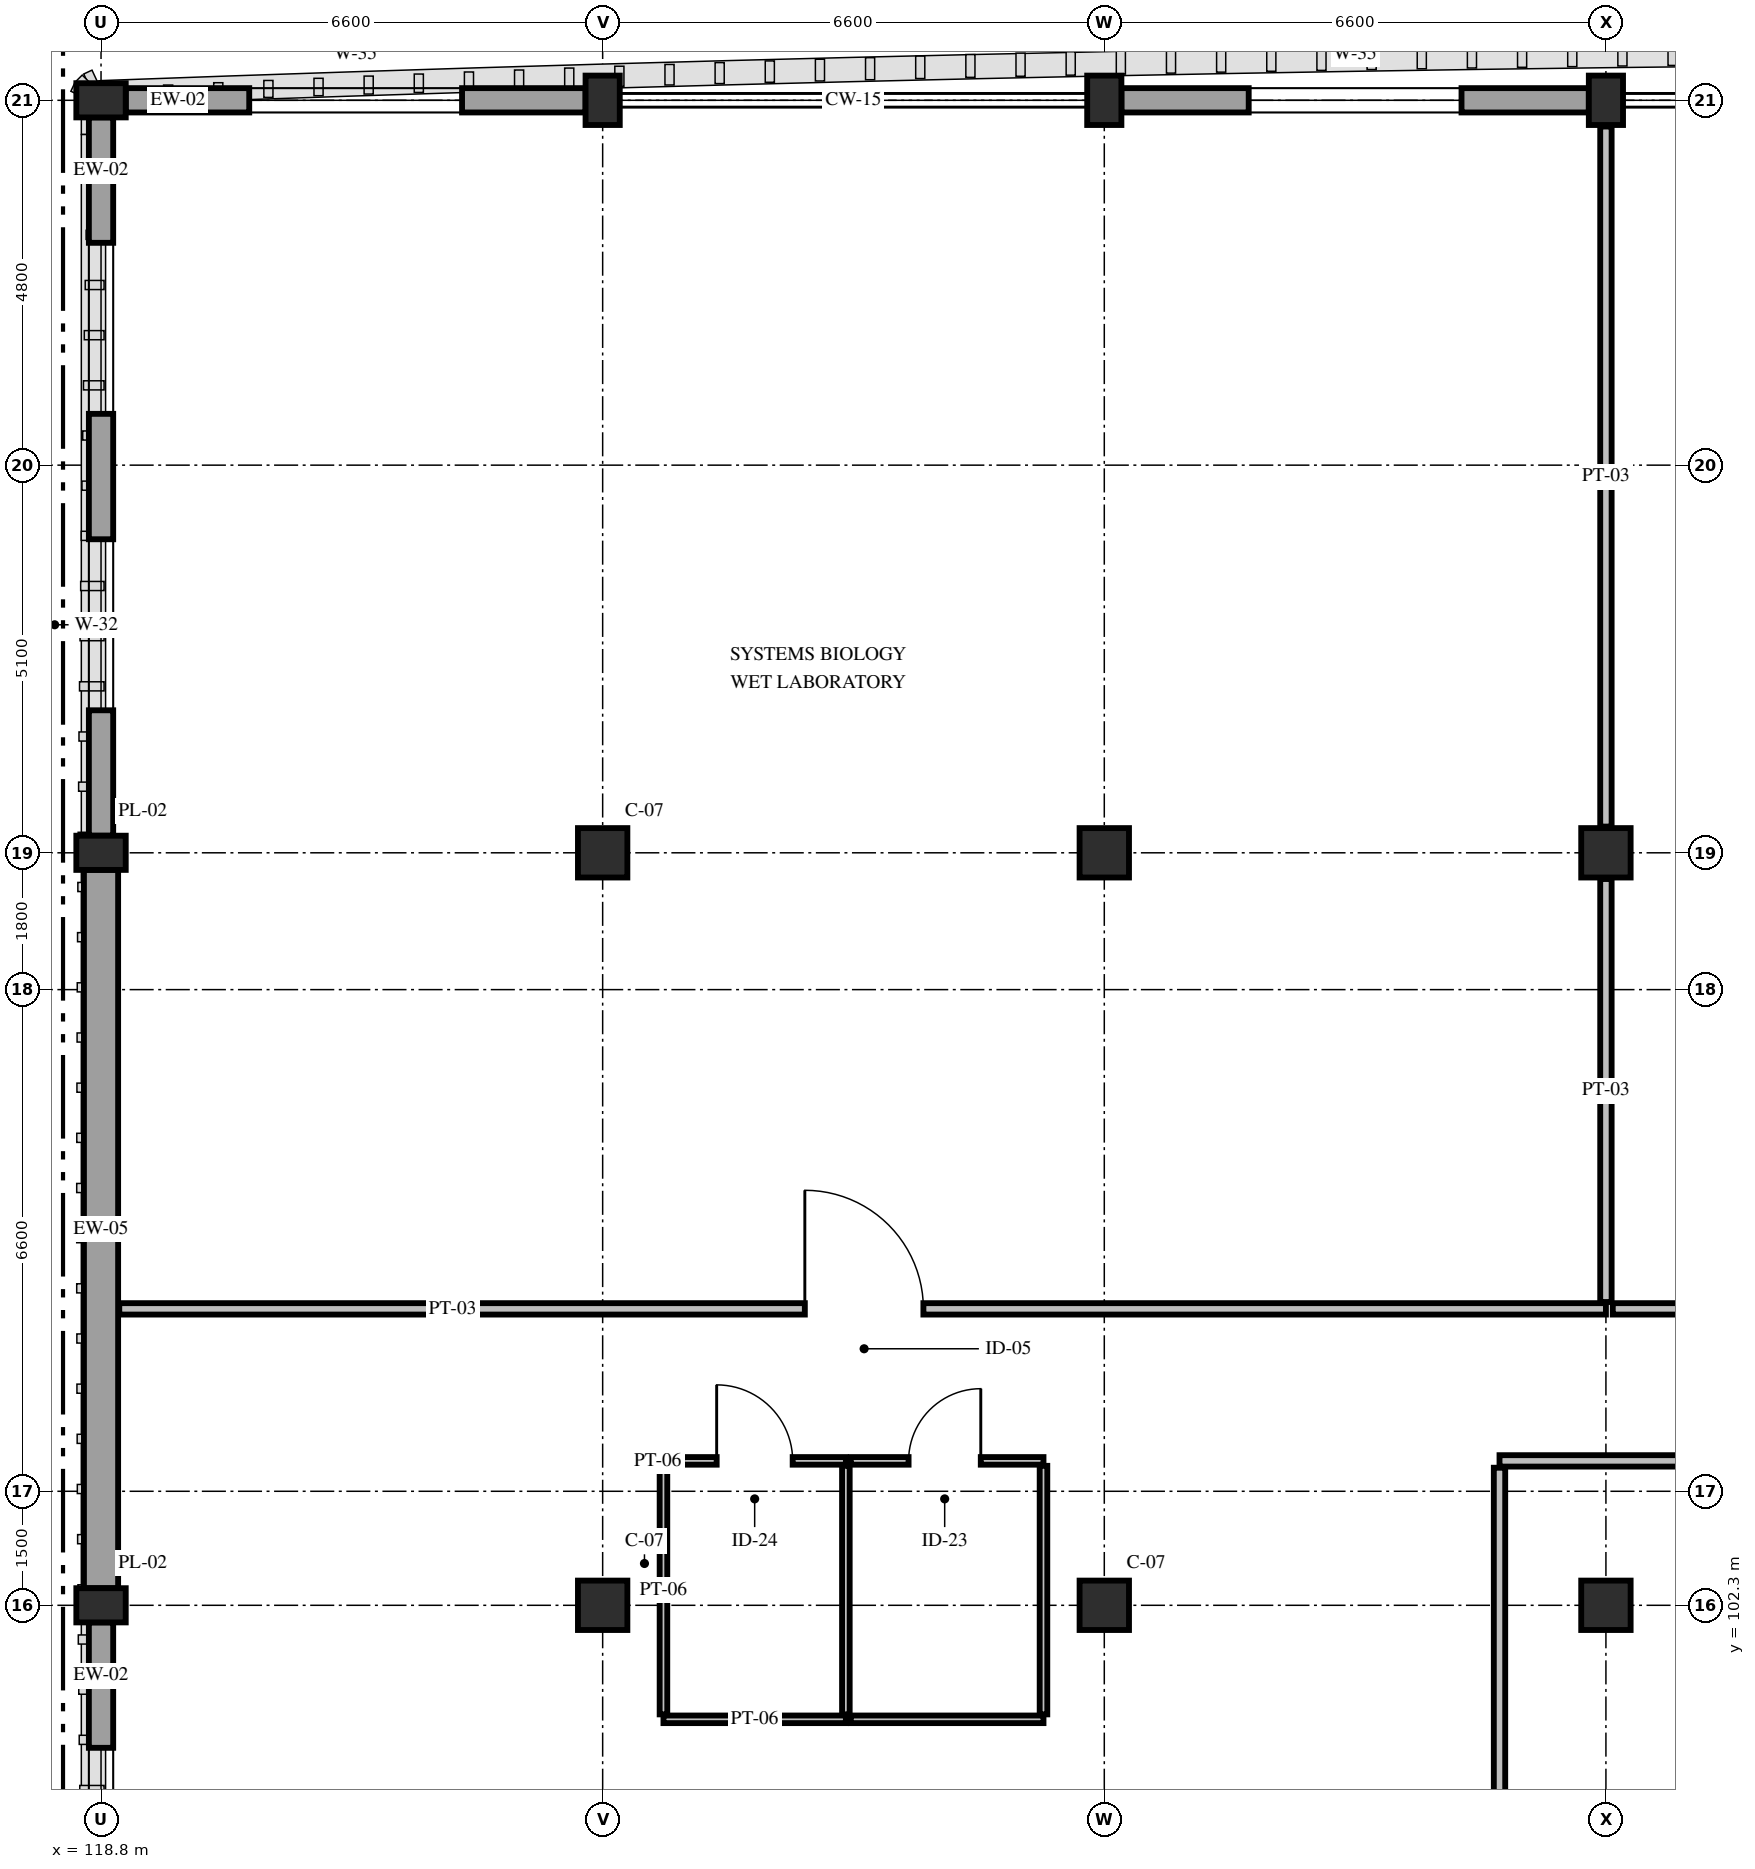
"""IFC4 building model, lengths in metres.
Left out: names, types, materials, properties, quantities, classifications, styles, units other than length and angle.
Written with IfcOpenShell. Run it as: python <this file> out.ifc"""

import sys

from ifc_helpers import new_model, si_unit, direction, frame, frame_2d, origin, origin_2d, place, context, subcontext, project, spatial, rectangle, extrude, element, fill, save


model = new_model("IFC4")
c1 = context("Model", 3, precision=1e-05, world=origin(), true_north=direction((0.0, 1.0)))
c2 = subcontext(c1, "Body", "Model", "MODEL_VIEW")
j1 = project(units=[si_unit("LENGTHUNIT", "METRE"), si_unit("PLANEANGLEUNIT", "RADIAN")], contexts=[c1])
p1 = place(None, origin())
s1 = spatial("IfcSite", under=j1, at=p1, CompositionType="ELEMENT")
p2 = place(p1, origin())
s2 = spatial("IfcBuilding", under=s1, at=p2, CompositionType="ELEMENT")
p3 = place(p2, frame((0.0, 0.0, 15.0)))
s3 = spatial("IfcBuildingStorey", under=s2, at=p3, CompositionType="ELEMENT", Elevation=15.0)
for number, where, z_axis, x_axis in (
    (1, (118.8, 102.3, 0.0), (0.0, 0.0, 1.0), (0.0, 1.0, 0.0)),
    (2, (118.8, 112.2, 0.0), (0.0, 0.0, 1.0), (0.0, 1.0, 0.0)),
    (3, (118.8, 122.1, 0.0), (0.0, 0.0, 1.0), (0.0, 1.0, 0.0)),
):
    element("IfcColumn", number, at=place(p3, frame(where, z_axis=z_axis, x_axis=x_axis)), inside=s3, PredefinedType="PILASTER", context=c2, shape_type="SweptSolid", body=[
        extrude(rectangle(XDim=0.45, YDim=0.65, at=origin_2d()), origin(), (0.0, 0.0, 1.0), 4.8),
    ])
for number, where, z_axis, x_axis in (
    (4, (125.4, 102.3, 0.0), (0.0, 0.0, 1.0), (1.0, 0.0, 0.0)),
    (5, (125.4, 112.2, 0.0), (0.0, 0.0, 1.0), (1.0, 0.0, 0.0)),
):
    element("IfcColumn", number, at=place(p3, frame(where, z_axis=z_axis, x_axis=x_axis)), inside=s3, PredefinedType="COLUMN", context=c2, shape_type="SweptSolid", body=[
        extrude(rectangle(XDim=0.65, YDim=0.65, at=origin_2d()), origin(), (0.0, 0.0, 1.0), 4.8),
    ])
p4 = place(p3, frame((125.4, 122.1, 0.0), z_axis=(0.0, 0.0, 1.0), x_axis=(1.0, 0.0, 0.0)))
e6 = element("IfcColumn", 6, at=p4, inside=s3, PredefinedType="PILASTER", context=c2, shape_type="SweptSolid", body=[
    extrude(rectangle(XDim=0.45, YDim=0.65, at=origin_2d()), origin(), (0.0, 0.0, 1.0), 4.8),
])
for number, where, z_axis, x_axis in (
    (7, (132.0, 102.3, 0.0), (0.0, 0.0, 1.0), (1.0, 0.0, 0.0)),
    (8, (132.0, 112.2, 0.0), (0.0, 0.0, 1.0), (1.0, 0.0, 0.0)),
):
    element("IfcColumn", number, at=place(p3, frame(where, z_axis=z_axis, x_axis=x_axis)), inside=s3, PredefinedType="COLUMN", context=c2, shape_type="SweptSolid", body=[
        extrude(rectangle(XDim=0.65, YDim=0.65, at=origin_2d()), origin(), (0.0, 0.0, 1.0), 4.8),
    ])
p5 = place(p3, frame((132.0, 122.1, 0.0), z_axis=(0.0, 0.0, 1.0), x_axis=(1.0, 0.0, 0.0)))
e9 = element("IfcColumn", 9, at=p5, inside=s3, PredefinedType="PILASTER", context=c2, shape_type="SweptSolid", body=[
    extrude(rectangle(XDim=0.45, YDim=0.65, at=origin_2d()), origin(), (0.0, 0.0, 1.0), 4.8),
])
for number, where, z_axis, x_axis in (
    (10, (138.6, 102.3, 0.0), (0.0, 0.0, 1.0), (1.0, 0.0, 0.0)),
    (11, (138.6, 112.2, 0.0), (0.0, 0.0, 1.0), (1.0, 0.0, 0.0)),
):
    element("IfcColumn", number, at=place(p3, frame(where, z_axis=z_axis, x_axis=x_axis)), inside=s3, PredefinedType="COLUMN", context=c2, shape_type="SweptSolid", body=[
        extrude(rectangle(XDim=0.65, YDim=0.65, at=origin_2d()), origin(), (0.0, 0.0, 1.0), 4.8),
    ])
p6 = place(p3, frame((138.6, 122.1, 0.0), z_axis=(0.0, 0.0, 1.0), x_axis=(1.0, 0.0, 0.0)))
e12 = element("IfcColumn", 12, at=p6, inside=s3, PredefinedType="PILASTER", context=c2, shape_type="SweptSolid", body=[
    extrude(rectangle(XDim=0.45, YDim=0.65, at=origin_2d()), origin(), (0.0, 0.0, 1.0), 4.8),
])
p7 = place(p3, frame((118.8, 92.625, 0.0), z_axis=(0.0, 0.0, 1.0), x_axis=(0.0, 1.0, 0.0)))
e13 = element("IfcWall", 13, at=p7, inside=s3, PredefinedType="STANDARD", context=c2, shape_type="SweptSolid", body=[
    extrude(rectangle(XDim=9.45, YDim=0.32, at=frame_2d((4.725, 0.0))), origin(), (0.0, 0.0, 1.0), 3.95),
])
p8 = place(p7, frame((1.65, 0.0, 0.85)))
e14 = element("IfcOpeningElement", 14, at=p8, cuts=e13, PredefinedType="OPENING", context=c2, shape_type="SweptSolid", body=[
    extrude(rectangle(XDim=2.25, YDim=1.88, at=frame_2d((1.125, 0.94))), frame((0.0, 0.175, 0.0), z_axis=(0.0, -1.0, 0.0), x_axis=(1.0, 0.0, 0.0)), (0.0, 0.0, 1.0), 0.35),
])
p9 = place(p7, frame((5.55, 0.0, 0.85)))
e15 = element("IfcOpeningElement", 15, at=p9, cuts=e13, PredefinedType="OPENING", context=c2, shape_type="SweptSolid", body=[
    extrude(rectangle(XDim=2.25, YDim=1.88, at=frame_2d((1.125, 0.94))), frame((0.0, 0.175, 0.0), z_axis=(0.0, -1.0, 0.0), x_axis=(1.0, 0.0, 0.0)), (0.0, 0.0, 1.0), 0.35),
])
p10 = place(p3, frame((118.8, 102.525, 0.0), z_axis=(0.0, 0.0, 1.0), x_axis=(0.0, 1.0, 0.0)))
e16 = element("IfcWall", 16, at=p10, inside=s3, PredefinedType="SOLIDWALL", context=c2, shape_type="SweptSolid", body=[
    extrude(rectangle(XDim=9.45, YDim=0.45, at=frame_2d((4.725, 0.0))), origin(), (0.0, 0.0, 1.0), 3.95),
])
p11 = place(p3, frame((118.8, 112.425, 0.0), z_axis=(0.0, 0.0, 1.0), x_axis=(0.0, 1.0, 0.0)))
e17 = element("IfcWall", 17, at=p11, inside=s3, PredefinedType="STANDARD", context=c2, shape_type="SweptSolid", body=[
    extrude(rectangle(XDim=9.45, YDim=0.32, at=frame_2d((4.725, 0.0))), origin(), (0.0, 0.0, 1.0), 3.95),
])
p12 = place(p11, frame((1.65, 0.0, 0.85)))
e18 = element("IfcOpeningElement", 18, at=p12, cuts=e17, PredefinedType="OPENING", context=c2, shape_type="SweptSolid", body=[
    extrude(rectangle(XDim=2.25, YDim=1.88, at=frame_2d((1.125, 0.94))), frame((0.0, 0.175, 0.0), z_axis=(0.0, -1.0, 0.0), x_axis=(1.0, 0.0, 0.0)), (0.0, 0.0, 1.0), 0.35),
])
p13 = place(p11, frame((5.55, 0.0, 0.85)))
e19 = element("IfcOpeningElement", 19, at=p13, cuts=e17, PredefinedType="OPENING", context=c2, shape_type="SweptSolid", body=[
    extrude(rectangle(XDim=2.25, YDim=1.88, at=frame_2d((1.125, 0.94))), frame((0.0, 0.175, 0.0), z_axis=(0.0, -1.0, 0.0), x_axis=(1.0, 0.0, 0.0)), (0.0, 0.0, 1.0), 0.35),
])
p14 = place(p3, frame((119.125, 122.1, 0.0), z_axis=(0.0, 0.0, 1.0), x_axis=(1.0, 0.0, 0.0)))
e20 = element("IfcWall", 20, at=p14, inside=s3, PredefinedType="STANDARD", context=c2, shape_type="SweptSolid", body=[
    extrude(rectangle(XDim=6.05, YDim=0.32, at=frame_2d((3.025, 0.0))), origin(), (0.0, 0.0, 1.0), 3.78),
])
p15 = place(p14, frame((1.625, 0.0, 0.85)))
e21 = element("IfcOpeningElement", 21, at=p15, cuts=e20, PredefinedType="OPENING", context=c2, shape_type="SweptSolid", body=[
    extrude(rectangle(XDim=2.8, YDim=1.88, at=frame_2d((1.4, 0.94))), frame((0.0, 0.175, 0.0), z_axis=(0.0, -1.0, 0.0), x_axis=(1.0, 0.0, 0.0)), (0.0, 0.0, 1.0), 0.35),
])
p16 = place(p3, frame((132.225, 122.1, 0.0), z_axis=(0.0, 0.0, 1.0), x_axis=(1.0, 0.0, 0.0)))
e22 = element("IfcWall", 22, at=p16, inside=s3, PredefinedType="STANDARD", context=c2, shape_type="SweptSolid", body=[
    extrude(rectangle(XDim=6.15, YDim=0.32, at=frame_2d((3.075, 0.0))), origin(), (0.0, 0.0, 1.0), 3.78),
])
p17 = place(p16, frame((1.675, 0.0, 0.85)))
e23 = element("IfcOpeningElement", 23, at=p17, cuts=e22, PredefinedType="OPENING", context=c2, shape_type="SweptSolid", body=[
    extrude(rectangle(XDim=2.8, YDim=1.88, at=frame_2d((1.4, 0.94))), frame((0.0, 0.175, 0.0), z_axis=(0.0, -1.0, 0.0), x_axis=(1.0, 0.0, 0.0)), (0.0, 0.0, 1.0), 0.35),
])
p18 = place(p3, frame((126.2, 100.8, 0.0), z_axis=(0.0, 0.0, 1.0), x_axis=(1.0, 0.0, 0.0)))
e24 = element("IfcWall", 24, at=p18, inside=s3, PredefinedType="PARTITIONING", context=c2, shape_type="SweptSolid", body=[
    extrude(rectangle(XDim=2.4, YDim=0.1, at=frame_2d((1.2, 0.0))), origin(), (0.0, 0.0, 1.0), 4.46),
])
p19 = place(p3, frame((126.2, 104.2, 0.0), z_axis=(0.0, 0.0, 1.0), x_axis=(1.0, 0.0, 0.0)))
e25 = element("IfcWall", 25, at=p19, inside=s3, PredefinedType="PARTITIONING", context=c2, shape_type="SweptSolid", body=[
    extrude(rectangle(XDim=2.4, YDim=0.1, at=frame_2d((1.2, 0.0))), origin(), (0.0, 0.0, 1.0), 4.245),
])
p20 = place(p19, frame((0.7, 0.0, 0.0)))
e26 = element("IfcOpeningElement", 26, at=p20, cuts=e25, PredefinedType="OPENING", context=c2, shape_type="SweptSolid", body=[
    extrude(rectangle(XDim=1.0, YDim=2.15, at=frame_2d((0.5, 1.075))), frame((0.0, 0.065, 0.0), z_axis=(0.0, -1.0, 0.0), x_axis=(1.0, 0.0, 0.0)), (0.0, 0.0, 1.0), 0.13),
])
for number, where, z_axis, x_axis in (
    (27, (126.2, 100.865, 0.0), (0.0, 0.0, 1.0), (0.0, 1.0, 0.0)),
    (28, (128.6, 100.865, 0.0), (0.0, 0.0, 1.0), (0.0, 1.0, 0.0)),
):
    element("IfcWall", number, at=place(p3, frame(where, z_axis=z_axis, x_axis=x_axis)), inside=s3, PredefinedType="PARTITIONING", context=c2, shape_type="SweptSolid", body=[
        extrude(rectangle(XDim=3.27, YDim=0.1, at=frame_2d((1.635, 0.0))), origin(), (0.0, 0.0, 1.0), 4.065),
    ])
p21 = place(p3, frame((128.665, 100.8, 0.0), z_axis=(0.0, 0.0, 1.0), x_axis=(1.0, 0.0, 0.0)))
e29 = element("IfcWall", 29, at=p21, inside=s3, PredefinedType="PARTITIONING", context=c2, shape_type="SweptSolid", body=[
    extrude(rectangle(XDim=2.535, YDim=0.1, at=frame_2d((1.268, 0.0))), origin(), (0.0, 0.0, 1.0), 4.46),
])
p22 = place(p3, frame((128.665, 104.2, 0.0), z_axis=(0.0, 0.0, 1.0), x_axis=(1.0, 0.0, 0.0)))
e30 = element("IfcWall", 30, at=p22, inside=s3, PredefinedType="PARTITIONING", context=c2, shape_type="SweptSolid", body=[
    extrude(rectangle(XDim=2.535, YDim=0.1, at=frame_2d((1.268, 0.0))), origin(), (0.0, 0.0, 1.0), 4.245),
])
p23 = place(p22, frame((0.76, 0.0, 0.0)))
e31 = element("IfcOpeningElement", 31, at=p23, cuts=e30, PredefinedType="OPENING", context=c2, shape_type="SweptSolid", body=[
    extrude(rectangle(XDim=0.95, YDim=2.15, at=frame_2d((0.475, 1.075))), frame((0.0, 0.065, 0.0), z_axis=(0.0, -1.0, 0.0), x_axis=(1.0, 0.0, 0.0)), (0.0, 0.0, 1.0), 0.13),
])
p24 = place(p3, frame((131.2, 100.865, 0.0), z_axis=(0.0, 0.0, 1.0), x_axis=(0.0, 1.0, 0.0)))
e32 = element("IfcWall", 32, at=p24, inside=s3, PredefinedType="PARTITIONING", context=c2, shape_type="SweptSolid", body=[
    extrude(rectangle(XDim=3.27, YDim=0.1, at=frame_2d((1.635, 0.0))), origin(), (0.0, 0.0, 1.0), 4.065),
])
p25 = place(p3, frame((119.04, 106.2, 0.0), z_axis=(0.0, 0.0, 1.0), x_axis=(1.0, 0.0, 0.0)))
e33 = element("IfcWall", 33, at=p25, inside=s3, PredefinedType="PARTITIONING", context=c2, shape_type="SweptSolid", body=[
    extrude(rectangle(XDim=19.56, YDim=0.15, at=frame_2d((9.78, 0.0))), origin(), (0.0, 0.0, 1.0), 3.78),
])
p26 = place(p25, frame((9.02, 0.0, 0.0)))
e34 = element("IfcOpeningElement", 34, at=p26, cuts=e33, PredefinedType="OPENING", context=c2, shape_type="SweptSolid", body=[
    extrude(rectangle(XDim=1.56, YDim=2.3, at=frame_2d((0.78, 1.15))), frame((0.0, 0.09, 0.0), z_axis=(0.0, -1.0, 0.0), x_axis=(1.0, 0.0, 0.0)), (0.0, 0.0, 1.0), 0.18),
])
p27 = place(p3, frame((138.6, 106.29, 0.0), z_axis=(0.0, 0.0, 1.0), x_axis=(0.0, 1.0, 0.0)))
e35 = element("IfcWall", 35, at=p27, inside=s3, PredefinedType="PARTITIONING", context=c2, shape_type="SweptSolid", body=[
    extrude(rectangle(XDim=5.565, YDim=0.15, at=frame_2d((2.782, 0.0))), origin(), (0.0, 0.0, 1.0), 3.78),
])
p28 = place(p3, frame((138.6, 112.545, 0.0), z_axis=(0.0, 0.0, 1.0), x_axis=(0.0, 1.0, 0.0)))
e36 = element("IfcWall", 36, at=p28, inside=s3, PredefinedType="PARTITIONING", context=c2, shape_type="SweptSolid", body=[
    extrude(rectangle(XDim=9.21, YDim=0.15, at=frame_2d((4.605, 0.0))), origin(), (0.0, 0.0, 1.0), 3.78),
])
p29 = place(p3, frame((138.69, 106.2, 0.0), z_axis=(0.0, 0.0, 1.0), x_axis=(1.0, 0.0, 0.0)))
e37 = element("IfcWall", 37, at=p29, inside=s3, PredefinedType="PARTITIONING", context=c2, shape_type="SweptSolid", body=[
    extrude(rectangle(XDim=13.11, YDim=0.15, at=frame_2d((6.555, 0.0))), origin(), (0.0, 0.0, 1.0), 3.78),
])
p30 = place(p29, frame((7.31, 0.0, 0.0)))
e38 = element("IfcOpeningElement", 38, at=p30, cuts=e37, PredefinedType="OPENING", context=c2, shape_type="SweptSolid", body=[
    extrude(rectangle(XDim=1.5, YDim=2.25, at=frame_2d((0.75, 1.125))), frame((0.0, 0.09, 0.0), z_axis=(0.0, -1.0, 0.0), x_axis=(1.0, 0.0, 0.0)), (0.0, 0.0, 1.0), 0.18),
])
p31 = place(p3, frame((137.2, 104.2, 0.0), z_axis=(0.0, 0.0, 1.0), x_axis=(1.0, 0.0, 0.0)))
e39 = element("IfcWall", 39, at=p31, inside=s3, PredefinedType="PARTITIONING", context=c2, shape_type="SweptSolid", body=[
    extrude(rectangle(XDim=11.2, YDim=0.15, at=frame_2d((5.6, 0.0))), origin(), (0.0, 0.0, 1.0), 3.78),
])
p32 = place(p31, frame((4.85, 0.0, 0.0)))
e40 = element("IfcOpeningElement", 40, at=p32, cuts=e39, PredefinedType="OPENING", context=c2, shape_type="SweptSolid", body=[
    extrude(rectangle(XDim=1.5, YDim=2.25, at=frame_2d((0.75, 1.125))), frame((0.0, 0.09, 0.0), z_axis=(0.0, -1.0, 0.0), x_axis=(1.0, 0.0, 0.0)), (0.0, 0.0, 1.0), 0.18),
])
p33 = place(p3, frame((137.2, 92.44, 0.0), z_axis=(0.0, 0.0, 1.0), x_axis=(0.0, 1.0, 0.0)))
e41 = element("IfcWall", 41, at=p33, inside=s3, PredefinedType="PARTITIONING", context=c2, shape_type="SweptSolid", body=[
    extrude(rectangle(XDim=11.67, YDim=0.15, at=frame_2d((5.835, 0.0))), origin(), (0.0, 0.0, 1.0), 3.93),
])
p34 = place(p9, origin())
e42 = element("IfcWindow", 42, at=p34, inside=s3, PartitioningType="DOUBLE_PANEL_VERTICAL", PredefinedType="WINDOW", context=c2, shape_type="SweptSolid", body=[
    extrude(rectangle(XDim=2.25, YDim=1.88, at=frame_2d((1.125, 0.94))), frame((0.0, 0.03, 0.0), z_axis=(0.0, -1.0, 0.0), x_axis=(1.0, 0.0, 0.0)), (0.0, 0.0, 1.0), 0.06),
])
fill(e15, e42)
p35 = place(p12, origin())
e43 = element("IfcWindow", 43, at=p35, inside=s3, PartitioningType="DOUBLE_PANEL_VERTICAL", PredefinedType="WINDOW", context=c2, shape_type="SweptSolid", body=[
    extrude(rectangle(XDim=2.25, YDim=1.88, at=frame_2d((1.125, 0.94))), frame((0.0, 0.03, 0.0), z_axis=(0.0, -1.0, 0.0), x_axis=(1.0, 0.0, 0.0)), (0.0, 0.0, 1.0), 0.06),
])
fill(e18, e43)
p36 = place(p13, origin())
e44 = element("IfcWindow", 44, at=p36, inside=s3, PartitioningType="DOUBLE_PANEL_VERTICAL", PredefinedType="WINDOW", context=c2, shape_type="SweptSolid", body=[
    extrude(rectangle(XDim=2.25, YDim=1.88, at=frame_2d((1.125, 0.94))), frame((0.0, 0.03, 0.0), z_axis=(0.0, -1.0, 0.0), x_axis=(1.0, 0.0, 0.0)), (0.0, 0.0, 1.0), 0.06),
])
fill(e19, e44)
p37 = place(p15, origin())
e45 = element("IfcWindow", 45, at=p37, inside=s3, PartitioningType="DOUBLE_PANEL_VERTICAL", PredefinedType="WINDOW", context=c2, shape_type="SweptSolid", body=[
    extrude(rectangle(XDim=2.8, YDim=1.88, at=frame_2d((1.4, 0.94))), frame((0.0, 0.03, 0.0), z_axis=(0.0, -1.0, 0.0), x_axis=(1.0, 0.0, 0.0)), (0.0, 0.0, 1.0), 0.06),
])
fill(e21, e45)
p38 = place(p17, origin())
e46 = element("IfcWindow", 46, at=p38, inside=s3, PartitioningType="DOUBLE_PANEL_VERTICAL", PredefinedType="WINDOW", context=c2, shape_type="SweptSolid", body=[
    extrude(rectangle(XDim=2.8, YDim=1.88, at=frame_2d((1.4, 0.94))), frame((0.0, 0.03, 0.0), z_axis=(0.0, -1.0, 0.0), x_axis=(1.0, 0.0, 0.0)), (0.0, 0.0, 1.0), 0.06),
])
fill(e23, e46)
p39 = place(p20, origin())
e47 = element("IfcDoor", 47, at=p39, inside=s3, OperationType="SINGLE_SWING_LEFT", PredefinedType="DOOR", context=c2, shape_type="SweptSolid", body=[
    extrude(rectangle(XDim=1.0, YDim=2.15, at=frame_2d((0.5, 1.075))), frame((0.0, 0.025, 0.0), z_axis=(0.0, -1.0, 0.0), x_axis=(1.0, 0.0, 0.0)), (0.0, 0.0, 1.0), 0.05),
])
fill(e26, e47)
p40 = place(p23, origin())
e48 = element("IfcDoor", 48, at=p40, inside=s3, OperationType="SINGLE_SWING_RIGHT", PredefinedType="DOOR", context=c2, shape_type="SweptSolid", body=[
    extrude(rectangle(XDim=0.95, YDim=2.15, at=frame_2d((0.475, 1.075))), frame((0.0, 0.025, 0.0), z_axis=(0.0, -1.0, 0.0), x_axis=(1.0, 0.0, 0.0)), (0.0, 0.0, 1.0), 0.05),
])
fill(e31, e48)
p41 = place(p26, origin())
e49 = element("IfcDoor", 49, at=p41, inside=s3, OperationType="SINGLE_SWING_LEFT", PredefinedType="DOOR", context=c2, shape_type="SweptSolid", body=[
    extrude(rectangle(XDim=1.56, YDim=2.3, at=frame_2d((0.78, 1.15))), frame((0.0, 0.025, 0.0), z_axis=(0.0, -1.0, 0.0), x_axis=(1.0, 0.0, 0.0)), (0.0, 0.0, 1.0), 0.05),
])
fill(e34, e49)
save(model, sys.argv[1])
